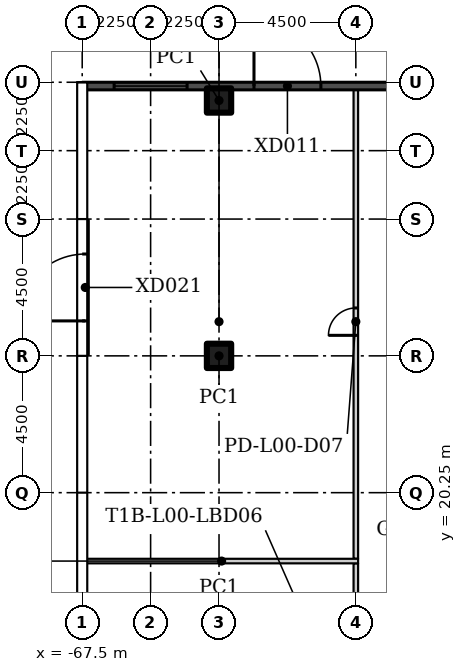
"""IFC4 building model, lengths in metres.
Left out: names, types, materials, properties, quantities, classifications, styles, units other than length and angle.
Written with IfcOpenShell. Run it as: python <this file> out.ifc"""

import sys

from ifc_helpers import new_model, si_unit, direction, frame, frame_2d, origin, origin_2d, place, context, subcontext, project, spatial, rectangle, hollow_rectangle, extrude, element, fill, save


model = new_model("IFC4")
c1 = context("Model", 3, precision=1e-05, world=origin(), true_north=direction((0.0, 1.0)))
c2 = subcontext(c1, "Body", "Model", "MODEL_VIEW")
j1 = project(units=[si_unit("LENGTHUNIT", "METRE"), si_unit("PLANEANGLEUNIT", "RADIAN")], contexts=[c1])
p1 = place(None, origin())
s1 = spatial("IfcSite", under=j1, at=p1, CompositionType="ELEMENT")
p2 = place(p1, origin())
s2 = spatial("IfcBuilding", under=s1, at=p2, CompositionType="ELEMENT")
p3 = place(p2, origin())
s3 = spatial("IfcBuildingStorey", under=s2, at=p3, CompositionType="ELEMENT", Elevation=0.0)
for number, where in (
    (1, (-63.0, 24.75, 0.0)),
    (2, (-63.0, 33.15, 0.0)),
):
    element("IfcColumn", number, at=place(p3, frame(where)), inside=s3, PredefinedType="COLUMN", context=c2, shape_type="SweptSolid", body=[
        extrude(hollow_rectangle(XDim=0.8, YDim=0.8, WallThickness=0.03, at=origin_2d()), origin(), (0.0, 0.0, 1.0), 6.1),
    ])
p4 = place(p3, frame((-58.5, 17.925, 0.0), z_axis=(0.0, 0.0, 1.0), x_axis=(0.0, -1.0, 0.0)))
e3 = element("IfcWall", 3, at=p4, inside=s3, PredefinedType="PARTITIONING", context=c2, shape_type="SweptSolid", body=[
    extrude(rectangle(XDim=11.1, YDim=0.15, at=frame_2d((5.55, 0.0))), origin(), (0.0, 0.0, 1.0), 6.1),
])
p5 = place(p4, frame((4.65, 0.0, 0.0)))
e4 = element("IfcOpeningElement", 4, at=p5, cuts=e3, PredefinedType="OPENING", context=c2, shape_type="SweptSolid", body=[
    extrude(rectangle(XDim=1.8, YDim=2.4, at=frame_2d((0.9, 1.2))), frame((0.0, 0.085, 0.0), z_axis=(0.0, -1.0, 0.0), x_axis=(1.0, 0.0, 0.0)), (0.0, 0.0, 1.0), 0.17),
])
p6 = place(p3, frame((-58.5, 18.075, 0.0), z_axis=(0.0, 0.0, 1.0), x_axis=(0.0, 1.0, 0.0)))
e5 = element("IfcWall", 5, at=p6, inside=s3, PredefinedType="PARTITIONING", context=c2, shape_type="SweptSolid", body=[
    extrude(rectangle(XDim=15.58, YDim=0.15, at=frame_2d((7.79, 0.0))), origin(), (0.0, 0.0, 1.0), 6.1),
])
p7 = place(p6, frame((7.35, 0.0, 0.0)))
e6 = element("IfcOpeningElement", 6, at=p7, cuts=e5, PredefinedType="OPENING", context=c2, shape_type="SweptSolid", body=[
    extrude(rectangle(XDim=0.9, YDim=2.1, at=frame_2d((0.45, 1.05))), frame((0.0, 0.085, 0.0), z_axis=(0.0, -1.0, 0.0), x_axis=(1.0, 0.0, 0.0)), (0.0, 0.0, 1.0), 0.17),
])
p8 = place(p3, frame((-58.425, 18.0, 0.0), z_axis=(0.0, 0.0, 1.0), x_axis=(-1.0, 0.0, 0.0)))
e7 = element("IfcWall", 7, at=p8, inside=s3, PredefinedType="PARTITIONING", context=c2, shape_type="SweptSolid", body=[
    extrude(rectangle(XDim=8.98, YDim=0.15, at=frame_2d((4.49, 0.0))), origin(), (0.0, 0.0, 1.0), 6.1),
])
p9 = place(p3, frame((-67.5, 33.625, 0.0)))
e8 = element("IfcWall", 8, at=p9, inside=s3, PredefinedType="SOLIDWALL", context=c2, shape_type="SweptSolid", body=[
    extrude(rectangle(XDim=130.5, YDim=0.25, at=frame_2d((65.25, 0.0))), origin(), (0.0, 0.0, 1.0), 6.15),
])
p10 = place(p9, frame((28.65, 0.0, 0.0)))
e9 = element("IfcOpeningElement", 9, at=p10, cuts=e8, PredefinedType="OPENING", context=c2, shape_type="SweptSolid", body=[
    extrude(rectangle(XDim=1.2, YDim=2.4, at=frame_2d((0.6, 1.2))), frame((0.0, 0.135, 0.0), z_axis=(0.0, -1.0, 0.0), x_axis=(1.0, 0.0, 0.0)), (0.0, 0.0, 1.0), 0.27),
])
p11 = place(p9, frame((37.25, 0.0, 0.0)))
e10 = element("IfcOpeningElement", 10, at=p11, cuts=e8, PredefinedType="OPENING", context=c2, shape_type="SweptSolid", body=[
    extrude(rectangle(XDim=2.0, YDim=2.4, at=frame_2d((1.0, 1.2))), frame((0.0, 0.135, 0.0), z_axis=(0.0, -1.0, 0.0), x_axis=(1.0, 0.0, 0.0)), (0.0, 0.0, 1.0), 0.27),
])
p12 = place(p9, frame((100.25, 0.0, 0.0)))
e11 = element("IfcOpeningElement", 11, at=p12, cuts=e8, PredefinedType="OPENING", context=c2, shape_type="SweptSolid", body=[
    extrude(rectangle(XDim=2.0, YDim=2.4, at=frame_2d((1.0, 1.2))), frame((0.0, 0.135, 0.0), z_axis=(0.0, -1.0, 0.0), x_axis=(1.0, 0.0, 0.0)), (0.0, 0.0, 1.0), 0.27),
])
p13 = place(p9, frame((55.25, 0.0, 0.0)))
e12 = element("IfcOpeningElement", 12, at=p13, cuts=e8, PredefinedType="OPENING", context=c2, shape_type="SweptSolid", body=[
    extrude(rectangle(XDim=2.0, YDim=2.4, at=frame_2d((1.0, 1.2))), frame((0.0, 0.135, 0.0), z_axis=(0.0, -1.0, 0.0), x_axis=(1.0, 0.0, 0.0)), (0.0, 0.0, 1.0), 0.27),
])
p14 = place(p9, frame((68.75, 0.0, 0.0)))
e13 = element("IfcOpeningElement", 13, at=p14, cuts=e8, PredefinedType="OPENING", context=c2, shape_type="SweptSolid", body=[
    extrude(rectangle(XDim=2.0, YDim=2.4, at=frame_2d((1.0, 1.2))), frame((0.0, 0.135, 0.0), z_axis=(0.0, -1.0, 0.0), x_axis=(1.0, 0.0, 0.0)), (0.0, 0.0, 1.0), 0.27),
])
p15 = place(p9, frame((10.25, 0.0, 0.0)))
e14 = element("IfcOpeningElement", 14, at=p15, cuts=e8, PredefinedType="OPENING", context=c2, shape_type="SweptSolid", body=[
    extrude(rectangle(XDim=2.0, YDim=2.4, at=frame_2d((1.0, 1.2))), frame((0.0, 0.135, 0.0), z_axis=(0.0, -1.0, 0.0), x_axis=(1.0, 0.0, 0.0)), (0.0, 0.0, 1.0), 0.27),
])
p16 = place(p9, frame((5.65, 0.0, 0.0)))
e15 = element("IfcOpeningElement", 15, at=p16, cuts=e8, PredefinedType="OPENING", context=c2, shape_type="SweptSolid", body=[
    extrude(rectangle(XDim=2.2, YDim=2.4, at=frame_2d((1.1, 1.2))), frame((0.0, 0.135, 0.0), z_axis=(0.0, -1.0, 0.0), x_axis=(1.0, 0.0, 0.0)), (0.0, 0.0, 1.0), 0.27),
])
p17 = place(p9, frame((113.65, 0.0, 0.0)))
e16 = element("IfcOpeningElement", 16, at=p17, cuts=e8, PredefinedType="OPENING", context=c2, shape_type="SweptSolid", body=[
    extrude(rectangle(XDim=2.2, YDim=2.4, at=frame_2d((1.1, 1.2))), frame((0.0, 0.135, 0.0), z_axis=(0.0, -1.0, 0.0), x_axis=(1.0, 0.0, 0.0)), (0.0, 0.0, 1.0), 0.27),
])
p18 = place(p9, frame((45.45, 0.0, 0.0)))
e17 = element("IfcOpeningElement", 17, at=p18, cuts=e8, PredefinedType="OPENING", context=c2, shape_type="SweptSolid", body=[
    extrude(rectangle(XDim=3.6, YDim=4.5, at=frame_2d((1.8, 2.25))), frame((0.0, 0.135, 0.0), z_axis=(0.0, -1.0, 0.0), x_axis=(1.0, 0.0, 0.0)), (0.0, 0.0, 1.0), 0.27),
])
p19 = place(p9, frame((91.15, 0.0, 0.0)))
e18 = element("IfcOpeningElement", 18, at=p19, cuts=e8, PredefinedType="OPENING", context=c2, shape_type="SweptSolid", body=[
    extrude(rectangle(XDim=2.2, YDim=2.4, at=frame_2d((1.1, 1.2))), frame((0.0, 0.135, 0.0), z_axis=(0.0, -1.0, 0.0), x_axis=(1.0, 0.0, 0.0)), (0.0, 0.0, 1.0), 0.27),
])
p20 = place(p9, frame((23.0, 0.0, 0.0)))
e19 = element("IfcOpeningElement", 19, at=p20, cuts=e8, PredefinedType="OPENING", context=c2, shape_type="SweptSolid", body=[
    extrude(rectangle(XDim=3.3, YDim=2.4, at=frame_2d((1.65, 1.2))), frame((0.0, 0.135, 0.0), z_axis=(0.0, -1.0, 0.0), x_axis=(1.0, 0.0, 0.0)), (0.0, 0.0, 1.0), 0.27),
])
p21 = place(p9, frame((59.0, 0.0, 0.0)))
e20 = element("IfcOpeningElement", 20, at=p21, cuts=e8, PredefinedType="OPENING", context=c2, shape_type="SweptSolid", body=[
    extrude(rectangle(XDim=3.3, YDim=2.4, at=frame_2d((1.65, 1.2))), frame((0.0, 0.135, 0.0), z_axis=(0.0, -1.0, 0.0), x_axis=(1.0, 0.0, 0.0)), (0.0, 0.0, 1.0), 0.27),
])
p22 = place(p9, frame((86.0, 0.0, 0.0)))
e21 = element("IfcOpeningElement", 21, at=p22, cuts=e8, PredefinedType="OPENING", context=c2, shape_type="SweptSolid", body=[
    extrude(rectangle(XDim=3.3, YDim=2.4, at=frame_2d((1.65, 1.2))), frame((0.0, 0.135, 0.0), z_axis=(0.0, -1.0, 0.0), x_axis=(1.0, 0.0, 0.0)), (0.0, 0.0, 1.0), 0.27),
])
p23 = place(p9, frame((122.0, 0.0, 0.0)))
e22 = element("IfcOpeningElement", 22, at=p23, cuts=e8, PredefinedType="OPENING", context=c2, shape_type="SweptSolid", body=[
    extrude(rectangle(XDim=3.3, YDim=2.4, at=frame_2d((1.65, 1.2))), frame((0.0, 0.135, 0.0), z_axis=(0.0, -1.0, 0.0), x_axis=(1.0, 0.0, 0.0)), (0.0, 0.0, 1.0), 0.27),
])
p24 = place(p9, frame((127.05, 0.0, 3.0)))
e23 = element("IfcOpeningElement", 23, at=p24, cuts=e8, PredefinedType="OPENING", context=c2, shape_type="SweptSolid", body=[
    extrude(rectangle(XDim=2.4, YDim=1.2, at=frame_2d((1.2, 0.6))), frame((0.0, 0.135, 0.0), z_axis=(0.0, -1.0, 0.0), x_axis=(1.0, 0.0, 0.0)), (0.0, 0.0, 1.0), 0.27),
])
p25 = place(p9, frame((118.05, 0.0, 3.0)))
e24 = element("IfcOpeningElement", 24, at=p25, cuts=e8, PredefinedType="OPENING", context=c2, shape_type="SweptSolid", body=[
    extrude(rectangle(XDim=2.4, YDim=1.2, at=frame_2d((1.2, 0.6))), frame((0.0, 0.135, 0.0), z_axis=(0.0, -1.0, 0.0), x_axis=(1.0, 0.0, 0.0)), (0.0, 0.0, 1.0), 0.27),
])
p26 = place(p9, frame((109.05, 0.0, 3.0)))
e25 = element("IfcOpeningElement", 25, at=p26, cuts=e8, PredefinedType="OPENING", context=c2, shape_type="SweptSolid", body=[
    extrude(rectangle(XDim=2.4, YDim=1.2, at=frame_2d((1.2, 0.6))), frame((0.0, 0.135, 0.0), z_axis=(0.0, -1.0, 0.0), x_axis=(1.0, 0.0, 0.0)), (0.0, 0.0, 1.0), 0.27),
])
p27 = place(p9, frame((104.55, 0.0, 3.0)))
e26 = element("IfcOpeningElement", 26, at=p27, cuts=e8, PredefinedType="OPENING", context=c2, shape_type="SweptSolid", body=[
    extrude(rectangle(XDim=2.4, YDim=1.2, at=frame_2d((1.2, 0.6))), frame((0.0, 0.135, 0.0), z_axis=(0.0, -1.0, 0.0), x_axis=(1.0, 0.0, 0.0)), (0.0, 0.0, 1.0), 0.27),
])
p28 = place(p9, frame((95.55, 0.0, 3.0)))
e27 = element("IfcOpeningElement", 27, at=p28, cuts=e8, PredefinedType="OPENING", context=c2, shape_type="SweptSolid", body=[
    extrude(rectangle(XDim=2.4, YDim=1.2, at=frame_2d((1.2, 0.6))), frame((0.0, 0.135, 0.0), z_axis=(0.0, -1.0, 0.0), x_axis=(1.0, 0.0, 0.0)), (0.0, 0.0, 1.0), 0.27),
])
p29 = place(p9, frame((82.05, 0.0, 3.0)))
e28 = element("IfcOpeningElement", 28, at=p29, cuts=e8, PredefinedType="OPENING", context=c2, shape_type="SweptSolid", body=[
    extrude(rectangle(XDim=2.4, YDim=1.2, at=frame_2d((1.2, 0.6))), frame((0.0, 0.135, 0.0), z_axis=(0.0, -1.0, 0.0), x_axis=(1.0, 0.0, 0.0)), (0.0, 0.0, 1.0), 0.27),
])
p30 = place(p9, frame((77.55, 0.0, 3.0)))
e29 = element("IfcOpeningElement", 29, at=p30, cuts=e8, PredefinedType="OPENING", context=c2, shape_type="SweptSolid", body=[
    extrude(rectangle(XDim=2.4, YDim=1.2, at=frame_2d((1.2, 0.6))), frame((0.0, 0.135, 0.0), z_axis=(0.0, -1.0, 0.0), x_axis=(1.0, 0.0, 0.0)), (0.0, 0.0, 1.0), 0.27),
])
p31 = place(p9, frame((73.05, 0.0, 3.0)))
e30 = element("IfcOpeningElement", 30, at=p31, cuts=e8, PredefinedType="OPENING", context=c2, shape_type="SweptSolid", body=[
    extrude(rectangle(XDim=2.4, YDim=1.2, at=frame_2d((1.2, 0.6))), frame((0.0, 0.135, 0.0), z_axis=(0.0, -1.0, 0.0), x_axis=(1.0, 0.0, 0.0)), (0.0, 0.0, 1.0), 0.27),
])
p32 = place(p9, frame((64.05, 0.0, 3.0)))
e31 = element("IfcOpeningElement", 31, at=p32, cuts=e8, PredefinedType="OPENING", context=c2, shape_type="SweptSolid", body=[
    extrude(rectangle(XDim=2.4, YDim=1.2, at=frame_2d((1.2, 0.6))), frame((0.0, 0.135, 0.0), z_axis=(0.0, -1.0, 0.0), x_axis=(1.0, 0.0, 0.0)), (0.0, 0.0, 1.0), 0.27),
])
p33 = place(p9, frame((50.55, 0.0, 3.0)))
e32 = element("IfcOpeningElement", 32, at=p33, cuts=e8, PredefinedType="OPENING", context=c2, shape_type="SweptSolid", body=[
    extrude(rectangle(XDim=2.4, YDim=1.2, at=frame_2d((1.2, 0.6))), frame((0.0, 0.135, 0.0), z_axis=(0.0, -1.0, 0.0), x_axis=(1.0, 0.0, 0.0)), (0.0, 0.0, 1.0), 0.27),
])
p34 = place(p9, frame((41.55, 0.0, 3.0)))
e33 = element("IfcOpeningElement", 33, at=p34, cuts=e8, PredefinedType="OPENING", context=c2, shape_type="SweptSolid", body=[
    extrude(rectangle(XDim=2.4, YDim=1.2, at=frame_2d((1.2, 0.6))), frame((0.0, 0.135, 0.0), z_axis=(0.0, -1.0, 0.0), x_axis=(1.0, 0.0, 0.0)), (0.0, 0.0, 1.0), 0.27),
])
p35 = place(p9, frame((32.55, 0.0, 3.0)))
e34 = element("IfcOpeningElement", 34, at=p35, cuts=e8, PredefinedType="OPENING", context=c2, shape_type="SweptSolid", body=[
    extrude(rectangle(XDim=2.4, YDim=1.2, at=frame_2d((1.2, 0.6))), frame((0.0, 0.135, 0.0), z_axis=(0.0, -1.0, 0.0), x_axis=(1.0, 0.0, 0.0)), (0.0, 0.0, 1.0), 0.27),
])
p36 = place(p9, frame((19.05, 0.0, 3.0)))
e35 = element("IfcOpeningElement", 35, at=p36, cuts=e8, PredefinedType="OPENING", context=c2, shape_type="SweptSolid", body=[
    extrude(rectangle(XDim=2.4, YDim=1.2, at=frame_2d((1.2, 0.6))), frame((0.0, 0.135, 0.0), z_axis=(0.0, -1.0, 0.0), x_axis=(1.0, 0.0, 0.0)), (0.0, 0.0, 1.0), 0.27),
])
p37 = place(p9, frame((14.55, 0.0, 3.0)))
e36 = element("IfcOpeningElement", 36, at=p37, cuts=e8, PredefinedType="OPENING", context=c2, shape_type="SweptSolid", body=[
    extrude(rectangle(XDim=2.4, YDim=1.2, at=frame_2d((1.2, 0.6))), frame((0.0, 0.135, 0.0), z_axis=(0.0, -1.0, 0.0), x_axis=(1.0, 0.0, 0.0)), (0.0, 0.0, 1.0), 0.27),
])
p38 = place(p9, frame((1.05, 0.0, 3.0)))
e37 = element("IfcOpeningElement", 37, at=p38, cuts=e8, PredefinedType="OPENING", context=c2, shape_type="SweptSolid", body=[
    extrude(rectangle(XDim=2.4, YDim=1.2, at=frame_2d((1.2, 0.6))), frame((0.0, 0.135, 0.0), z_axis=(0.0, -1.0, 0.0), x_axis=(1.0, 0.0, 0.0)), (0.0, 0.0, 1.0), 0.27),
])
p39 = place(p3, frame((-67.4, 24.79, 0.0), z_axis=(0.0, 0.0, 1.0), x_axis=(0.0, 1.0, 0.0)))
e38 = element("IfcWall", 38, at=p39, inside=s3, PredefinedType="SOLIDWALL", context=c2, shape_type="SweptSolid", body=[
    extrude(rectangle(XDim=4.42, YDim=0.2, at=frame_2d((2.21, 0.0))), origin(), (0.0, 0.0, 1.0), 3.0),
])
p40 = place(p39, frame((1.11, 0.0, 0.0)))
e39 = element("IfcOpeningElement", 39, at=p40, cuts=e38, PredefinedType="OPENING", context=c2, shape_type="SweptSolid", body=[
    extrude(rectangle(XDim=2.2, YDim=2.4, at=frame_2d((1.1, 1.2))), frame((0.0, 0.11, 0.0), z_axis=(0.0, -1.0, 0.0), x_axis=(1.0, 0.0, 0.0)), (0.0, 0.0, 1.0), 0.22),
])
p41 = place(p7, origin())
e40 = element("IfcDoor", 40, at=p41, inside=s3, OperationType="SINGLE_SWING_RIGHT", PredefinedType="DOOR", context=c2, shape_type="SweptSolid", body=[
    extrude(rectangle(XDim=0.9, YDim=2.1, at=frame_2d((0.45, 1.05))), frame((0.0, 0.025, 0.0), z_axis=(0.0, -1.0, 0.0), x_axis=(1.0, 0.0, 0.0)), (0.0, 0.0, 1.0), 0.05),
])
fill(e6, e40)
p42 = place(p16, origin())
e41 = element("IfcDoor", 41, at=p42, inside=s3, OperationType="DOUBLE_DOOR_SINGLE_SWING", PredefinedType="DOOR", context=c2, shape_type="SweptSolid", body=[
    extrude(rectangle(XDim=2.2, YDim=2.4, at=frame_2d((1.1, 1.2))), frame((0.0, 0.025, 0.0), z_axis=(0.0, -1.0, 0.0), x_axis=(1.0, 0.0, 0.0)), (0.0, 0.0, 1.0), 0.05),
])
fill(e15, e41)
p43 = place(p38, origin())
e42 = element("IfcWindow", 42, at=p43, inside=s3, PartitioningType="DOUBLE_PANEL_HORIZONTAL", PredefinedType="WINDOW", context=c2, shape_type="SweptSolid", body=[
    extrude(rectangle(XDim=2.4, YDim=1.2, at=frame_2d((1.2, 0.6))), frame((0.0, 0.03, 0.0), z_axis=(0.0, -1.0, 0.0), x_axis=(1.0, 0.0, 0.0)), (0.0, 0.0, 1.0), 0.06),
])
fill(e37, e42)
p44 = place(p40, origin())
e43 = element("IfcDoor", 43, at=p44, inside=s3, OperationType="DOUBLE_DOOR_SINGLE_SWING", PredefinedType="DOOR", context=c2, shape_type="SweptSolid", body=[
    extrude(rectangle(XDim=2.2, YDim=2.4, at=frame_2d((1.1, 1.2))), frame((0.0, 0.025, 0.0), z_axis=(0.0, -1.0, 0.0), x_axis=(1.0, 0.0, 0.0)), (0.0, 0.0, 1.0), 0.05),
])
fill(e39, e43)
save(model, sys.argv[1])
